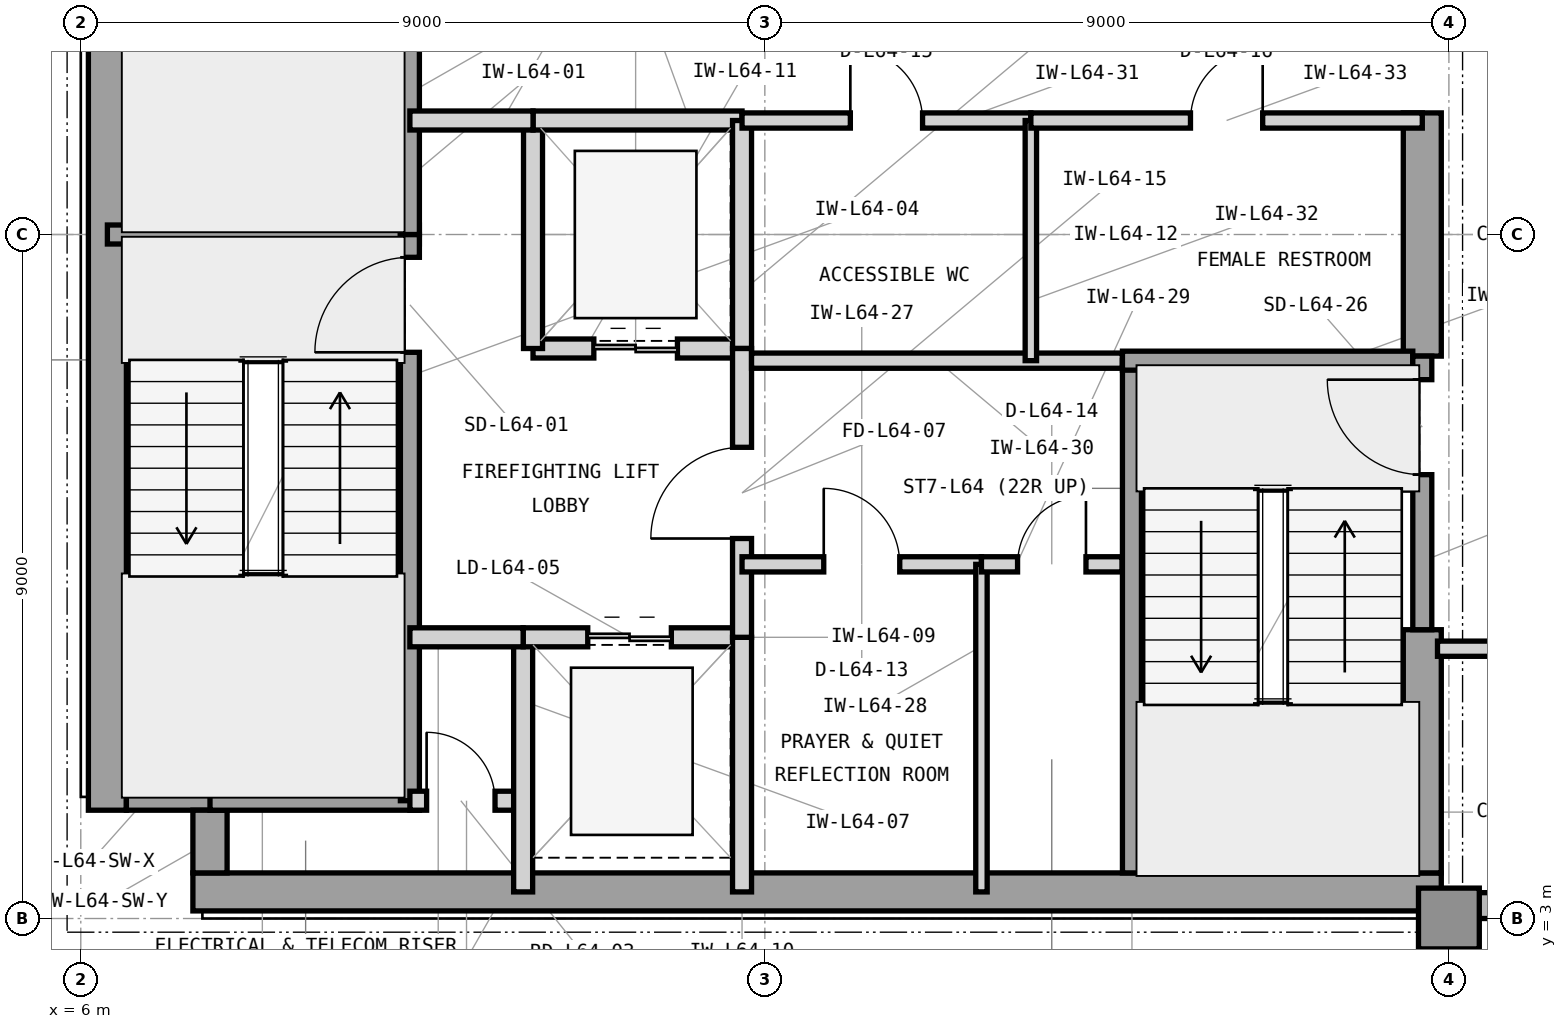
"""IFC4 building model, lengths in metres.
Left out: names, types, materials, properties, quantities, classifications, styles, units other than length and angle.
Written with IfcOpenShell. Run it as: python <this file> out.ifc"""

import sys

from ifc_helpers import new_model, si_unit, direction, frame, frame_2d, origin, origin_2d, place, context, subcontext, project, spatial, rectangle, extrude, element, fill, save


model = new_model("IFC4")
c1 = context("Model", 3, precision=1e-05, world=origin(), true_north=direction((0.0, 1.0)))
c2 = subcontext(c1, "Body", "Model", "MODEL_VIEW")
j1 = project(units=[si_unit("LENGTHUNIT", "METRE"), si_unit("PLANEANGLEUNIT", "RADIAN")], contexts=[c1])
p1 = place(None, origin())
s1 = spatial("IfcSite", under=j1, at=p1, CompositionType="ELEMENT")
p2 = place(p1, origin())
s2 = spatial("IfcBuilding", under=s1, at=p2, CompositionType="ELEMENT")
p3 = place(p2, frame((0.0, 0.0, 262.5)))
s3 = spatial("IfcBuildingStorey", under=s2, at=p3, CompositionType="ELEMENT", Elevation=262.5)
p4 = place(p3, frame((7.475, 3.35, 0.0), z_axis=(0.0, 0.0, 1.0), x_axis=(1.0, 0.0, 0.0)))
e1 = element("IfcWall", 1, at=p4, inside=s3, PredefinedType="SHEAR", context=c2, shape_type="SweptSolid", body=[
    extrude(rectangle(XDim=16.425, YDim=0.5, at=frame_2d((8.212, 0.0))), origin(), (0.0, 0.0, 1.0), 3.9),
])
p5 = place(p3, frame((6.35, 4.425, 0.0), z_axis=(0.0, 0.0, 1.0), x_axis=(0.0, 1.0, 0.0)))
e2 = element("IfcWall", 2, at=p5, inside=s3, PredefinedType="SHEAR", context=c2, shape_type="SweptSolid", body=[
    extrude(rectangle(XDim=15.15, YDim=0.5, at=frame_2d((7.575, 0.0))), origin(), (0.0, 0.0, 1.0), 3.9),
])
p6 = place(p3, frame((23.65, 3.6, 0.0), z_axis=(0.0, 0.0, 1.0), x_axis=(0.0, 1.0, 0.0)))
e3 = element("IfcWall", 3, at=p6, inside=s3, PredefinedType="SHEAR", context=c2, shape_type="SweptSolid", body=[
    extrude(rectangle(XDim=3.2, YDim=0.5, at=frame_2d((1.6, 0.0))), origin(), (0.0, 0.0, 1.0), 3.9),
])
p7 = place(p3, frame((23.65, 10.4, 0.0), z_axis=(0.0, 0.0, 1.0), x_axis=(0.0, 1.0, 0.0)))
e4 = element("IfcWall", 4, at=p7, inside=s3, PredefinedType="SHEAR", context=c2, shape_type="SweptSolid", body=[
    extrude(rectangle(XDim=3.2, YDim=0.5, at=frame_2d((1.6, 0.0))), origin(), (0.0, 0.0, 1.0), 3.9),
])
p8 = place(p3, frame((6.6, 4.65, 0.0), z_axis=(0.0, 0.0, 1.0), x_axis=(1.0, 0.0, 0.0)))
e5 = element("IfcWall", 5, at=p8, inside=s3, PredefinedType="SHEAR", context=c2, shape_type="SweptSolid", body=[
    extrude(rectangle(XDim=1.325, YDim=0.45, at=frame_2d((0.663, 0.0))), origin(), (0.0, 0.0, 1.0), 3.9),
])
p9 = place(p3, frame((7.7, 3.6, 0.0), z_axis=(0.0, 0.0, 1.0), x_axis=(0.0, 1.0, 0.0)))
e6 = element("IfcWall", 6, at=p9, inside=s3, PredefinedType="SHEAR", context=c2, shape_type="SweptSolid", body=[
    extrude(rectangle(XDim=0.825, YDim=0.45, at=frame_2d((0.413, 0.0))), origin(), (0.0, 0.0, 1.0), 3.9),
])
p10 = place(p3, frame((24.0, 3.0, 0.0), z_axis=(0.0, 0.0, 1.0), x_axis=(1.0, 0.0, 0.0)))
e7 = element("IfcColumn", 7, at=p10, inside=s3, PredefinedType="COLUMN", context=c2, shape_type="SweptSolid", body=[
    extrude(rectangle(XDim=0.8, YDim=0.8, at=origin_2d()), origin(), (0.0, 0.0, 1.0), 3.9),
])
p11 = place(p3, frame((23.9, 3.17, 0.0), z_axis=(0.0, 0.0, 1.0), x_axis=(1.0, 0.0, 0.0)))
e8 = element("IfcWall", 8, at=p11, inside=s3, PredefinedType="STANDARD", context=c2, shape_type="SweptSolid", body=[
    extrude(rectangle(XDim=28.5, YDim=0.34, at=frame_2d((14.25, 0.0))), origin(), (0.0, 0.0, 1.0), 3.715),
])
p12 = place(p11, frame((1.425, 0.0, 0.8)))
e9 = element("IfcOpeningElement", 9, at=p12, cuts=e8, PredefinedType="OPENING", context=c2, shape_type="SweptSolid", body=[
    extrude(rectangle(XDim=1.9, YDim=2.35, at=frame_2d((0.95, 1.175))), frame((0.0, 0.18, 0.0), z_axis=(0.0, -1.0, 0.0), x_axis=(1.0, 0.0, 0.0)), (0.0, 0.0, 1.0), 0.36),
])
p13 = place(p11, frame((10.575, 0.0, 0.8)))
e10 = element("IfcOpeningElement", 10, at=p13, cuts=e8, PredefinedType="OPENING", context=c2, shape_type="SweptSolid", body=[
    extrude(rectangle(XDim=2.6, YDim=2.35, at=frame_2d((1.3, 1.175))), frame((0.0, 0.18, 0.0), z_axis=(0.0, -1.0, 0.0), x_axis=(1.0, 0.0, 0.0)), (0.0, 0.0, 1.0), 0.36),
])
p14 = place(p11, frame((20.075, 0.0, 0.8)))
e11 = element("IfcOpeningElement", 11, at=p14, cuts=e8, PredefinedType="OPENING", context=c2, shape_type="SweptSolid", body=[
    extrude(rectangle(XDim=2.6, YDim=2.35, at=frame_2d((1.3, 1.175))), frame((0.0, 0.18, 0.0), z_axis=(0.0, -1.0, 0.0), x_axis=(1.0, 0.0, 0.0)), (0.0, 0.0, 1.0), 0.36),
])
p15 = place(p3, frame((6.35, 12.0, 0.0), z_axis=(0.0, 0.0, 1.0), x_axis=(1.0, 0.0, 0.0)))
e12 = element("IfcWall", 12, at=p15, inside=s3, PredefinedType="SHEAR", context=c2, shape_type="SweptSolid", body=[
    extrude(rectangle(XDim=4.105, YDim=0.25, at=frame_2d((2.052, 0.0))), origin(), (0.0, 0.0, 1.0), 3.9),
])
p16 = place(p3, frame((7.7, 4.55, 0.0), z_axis=(0.0, 0.0, 1.0), x_axis=(1.0, 0.0, 0.0)))
e13 = element("IfcWall", 13, at=p16, inside=s3, PredefinedType="SHEAR", context=c2, shape_type="SweptSolid", body=[
    extrude(rectangle(XDim=2.755, YDim=0.25, at=frame_2d((1.377, 0.0))), origin(), (0.0, 0.0, 1.0), 3.9),
])
p17 = place(p3, frame((10.33, 4.55, 0.0), z_axis=(0.0, 0.0, 1.0), x_axis=(0.0, 1.0, 0.0)))
e14 = element("IfcWall", 14, at=p17, inside=s3, PredefinedType="SHEAR", context=c2, shape_type="SweptSolid", body=[
    extrude(rectangle(XDim=7.45, YDim=0.25, at=frame_2d((3.725, 0.0))), origin(), (0.0, 0.0, 1.0), 3.9),
])
p18 = place(p17, frame((5.9, 0.0, 0.0)))
e15 = element("IfcOpeningElement", 15, at=p18, cuts=e14, PredefinedType="OPENING", context=c2, shape_type="SweptSolid", body=[
    extrude(rectangle(XDim=1.25, YDim=2.2, at=frame_2d((0.625, 1.1))), frame((0.0, 0.135, 0.0), z_axis=(0.0, -1.0, 0.0), x_axis=(1.0, 0.0, 0.0)), (0.0, 0.0, 1.0), 0.27),
])
p19 = place(p3, frame((10.33, 12.0, 0.0), z_axis=(0.0, 0.0, 1.0), x_axis=(0.0, 1.0, 0.0)))
e16 = element("IfcWall", 16, at=p19, inside=s3, PredefinedType="SHEAR", context=c2, shape_type="SweptSolid", body=[
    extrude(rectangle(XDim=7.45, YDim=0.25, at=frame_2d((3.725, 0.0))), origin(), (0.0, 0.0, 1.0), 3.9),
])
p20 = place(p19, frame((5.85, 0.0, 0.0)))
e17 = element("IfcOpeningElement", 17, at=p20, cuts=e16, PredefinedType="OPENING", context=c2, shape_type="SweptSolid", body=[
    extrude(rectangle(XDim=1.25, YDim=2.2, at=frame_2d((0.625, 1.1))), frame((0.0, 0.135, 0.0), z_axis=(0.0, -1.0, 0.0), x_axis=(1.0, 0.0, 0.0)), (0.0, 0.0, 1.0), 0.27),
])
p21 = place(p3, frame((10.33, 4.55, 0.0), z_axis=(0.0, 0.0, 1.0), x_axis=(1.0, 0.0, 0.0)))
e18 = element("IfcWall", 18, at=p21, inside=s3, PredefinedType="PARTITIONING", context=c2, shape_type="SweptSolid", body=[
    extrude(rectangle(XDim=1.49, YDim=0.25, at=frame_2d((0.745, 0.0))), origin(), (0.0, 0.0, 1.0), 3.705),
])
p22 = place(p21, frame((0.22, 0.0, 0.0)))
e19 = element("IfcOpeningElement", 19, at=p22, cuts=e18, PredefinedType="OPENING", context=c2, shape_type="SweptSolid", body=[
    extrude(rectangle(XDim=0.9, YDim=2.1, at=frame_2d((0.45, 1.05))), frame((0.0, 0.135, 0.0), z_axis=(0.0, -1.0, 0.0), x_axis=(1.0, 0.0, 0.0)), (0.0, 0.0, 1.0), 0.27),
])
p23 = place(p3, frame((11.82, 3.35, 0.0), z_axis=(0.0, 0.0, 1.0), x_axis=(0.0, 1.0, 0.0)))
e20 = element("IfcWall", 20, at=p23, inside=s3, PredefinedType="PARTITIONING", context=c2, shape_type="SweptSolid", body=[
    extrude(rectangle(XDim=3.35, YDim=0.25, at=frame_2d((1.675, 0.0))), origin(), (0.0, 0.0, 1.0), 3.705),
])
p24 = place(p3, frame((11.82, 6.7, 0.0), z_axis=(0.0, 0.0, 1.0), x_axis=(1.0, 0.0, 0.0)))
e21 = element("IfcWall", 21, at=p24, inside=s3, PredefinedType="PARTITIONING", context=c2, shape_type="SweptSolid", body=[
    extrude(rectangle(XDim=2.88, YDim=0.25, at=frame_2d((1.44, 0.0))), origin(), (0.0, 0.0, 1.0), 3.088),
])
p25 = place(p24, frame((0.85, 0.0, 0.0)))
e22 = element("IfcOpeningElement", 22, at=p25, cuts=e21, PredefinedType="OPENING", context=c2, shape_type="SweptSolid", body=[
    extrude(rectangle(XDim=1.1, YDim=2.25, at=frame_2d((0.55, 1.125))), frame((0.0, 0.135, 0.0), z_axis=(0.0, -1.0, 0.0), x_axis=(1.0, 0.0, 0.0)), (0.0, 0.0, 1.0), 0.27),
])
p26 = place(p3, frame((14.7, 3.35, 0.0), z_axis=(0.0, 0.0, 1.0), x_axis=(0.0, 1.0, 0.0)))
e23 = element("IfcWall", 23, at=p26, inside=s3, PredefinedType="PARTITIONING", context=c2, shape_type="SweptSolid", body=[
    extrude(rectangle(XDim=3.35, YDim=0.25, at=frame_2d((1.675, 0.0))), origin(), (0.0, 0.0, 1.0), 3.705),
])
p27 = place(p3, frame((11.95, 10.5, 0.0), z_axis=(0.0, 0.0, 1.0), x_axis=(1.0, 0.0, 0.0)))
e24 = element("IfcWall", 24, at=p27, inside=s3, PredefinedType="PARTITIONING", context=c2, shape_type="SweptSolid", body=[
    extrude(rectangle(XDim=2.75, YDim=0.25, at=frame_2d((1.375, 0.0))), origin(), (0.0, 0.0, 1.0), 3.088),
])
p28 = place(p27, frame((0.8, 0.0, 0.0)))
e25 = element("IfcOpeningElement", 25, at=p28, cuts=e24, PredefinedType="OPENING", context=c2, shape_type="SweptSolid", body=[
    extrude(rectangle(XDim=1.1, YDim=2.25, at=frame_2d((0.55, 1.125))), frame((0.0, 0.135, 0.0), z_axis=(0.0, -1.0, 0.0), x_axis=(1.0, 0.0, 0.0)), (0.0, 0.0, 1.0), 0.27),
])
p29 = place(p3, frame((11.95, 10.5, 0.0), z_axis=(0.0, 0.0, 1.0), x_axis=(0.0, 1.0, 0.0)))
e26 = element("IfcWall", 26, at=p29, inside=s3, PredefinedType="PARTITIONING", context=c2, shape_type="SweptSolid", body=[
    extrude(rectangle(XDim=3.0, YDim=0.25, at=frame_2d((1.5, 0.0))), origin(), (0.0, 0.0, 1.0), 3.705),
])
p30 = place(p3, frame((11.95, 13.5, 0.0), z_axis=(0.0, 0.0, 1.0), x_axis=(1.0, 0.0, 0.0)))
e27 = element("IfcWall", 27, at=p30, inside=s3, PredefinedType="PARTITIONING", context=c2, shape_type="SweptSolid", body=[
    extrude(rectangle(XDim=2.75, YDim=0.25, at=frame_2d((1.375, 0.0))), origin(), (0.0, 0.0, 1.0), 3.088),
])
p31 = place(p3, frame((14.7, 10.5, 0.0), z_axis=(0.0, 0.0, 1.0), x_axis=(0.0, 1.0, 0.0)))
e28 = element("IfcWall", 28, at=p31, inside=s3, PredefinedType="PARTITIONING", context=c2, shape_type="SweptSolid", body=[
    extrude(rectangle(XDim=3.0, YDim=0.25, at=frame_2d((1.5, 0.0))), origin(), (0.0, 0.0, 1.0), 3.705),
])
p32 = place(p3, frame((14.7, 6.7, 0.0), z_axis=(0.0, 0.0, 1.0), x_axis=(0.0, 1.0, 0.0)))
e29 = element("IfcWall", 29, at=p32, inside=s3, PredefinedType="PARTITIONING", context=c2, shape_type="SweptSolid", body=[
    extrude(rectangle(XDim=3.8, YDim=0.25, at=frame_2d((1.9, 0.0))), origin(), (0.0, 0.0, 1.0), 3.705),
])
p33 = place(p32, frame((1.3, 0.0, 0.0)))
e30 = element("IfcOpeningElement", 30, at=p33, cuts=e29, PredefinedType="OPENING", context=c2, shape_type="SweptSolid", body=[
    extrude(rectangle(XDim=1.2, YDim=2.2, at=frame_2d((0.6, 1.1))), frame((0.0, 0.135, 0.0), z_axis=(0.0, -1.0, 0.0), x_axis=(1.0, 0.0, 0.0)), (0.0, 0.0, 1.0), 0.27),
])
p34 = place(p3, frame((10.33, 13.5, 0.0), z_axis=(0.0, 0.0, 1.0), x_axis=(1.0, 0.0, 0.0)))
e31 = element("IfcWall", 31, at=p34, inside=s3, PredefinedType="PARTITIONING", context=c2, shape_type="SweptSolid", body=[
    extrude(rectangle(XDim=1.62, YDim=0.25, at=frame_2d((0.81, 0.0))), origin(), (0.0, 0.0, 1.0), 3.088),
])
p35 = place(p3, frame((10.33, 6.7, 0.0), z_axis=(0.0, 0.0, 1.0), x_axis=(1.0, 0.0, 0.0)))
e32 = element("IfcWall", 32, at=p35, inside=s3, PredefinedType="PARTITIONING", context=c2, shape_type="SweptSolid", body=[
    extrude(rectangle(XDim=1.49, YDim=0.25, at=frame_2d((0.745, 0.0))), origin(), (0.0, 0.0, 1.0), 3.088),
])
p36 = place(p3, frame((14.7, 7.66, 0.0), z_axis=(0.0, 0.0, 1.0), x_axis=(1.0, 0.0, 0.0)))
e33 = element("IfcWall", 33, at=p36, inside=s3, PredefinedType="PARTITIONING", context=c2, shape_type="SweptSolid", body=[
    extrude(rectangle(XDim=3.15, YDim=0.2, at=frame_2d((1.575, 0.0))), origin(), (0.0, 0.0, 1.0), 3.705),
])
p37 = place(p36, frame((1.075, 0.0, 0.0)))
e34 = element("IfcOpeningElement", 34, at=p37, cuts=e33, PredefinedType="OPENING", context=c2, shape_type="SweptSolid", body=[
    extrude(rectangle(XDim=1.0, YDim=2.15, at=frame_2d((0.5, 1.075))), frame((0.0, 0.11, 0.0), z_axis=(0.0, -1.0, 0.0), x_axis=(1.0, 0.0, 0.0)), (0.0, 0.0, 1.0), 0.22),
])
p38 = place(p3, frame((17.85, 3.35, 0.0), z_axis=(0.0, 0.0, 1.0), x_axis=(0.0, 1.0, 0.0)))
e35 = element("IfcWall", 35, at=p38, inside=s3, PredefinedType="PARTITIONING", context=c2, shape_type="SweptSolid", body=[
    extrude(rectangle(XDim=4.31, YDim=0.15, at=frame_2d((2.155, 0.0))), origin(), (0.0, 0.0, 1.0), 3.705),
])
p39 = place(p3, frame((17.85, 7.66, 0.0), z_axis=(0.0, 0.0, 1.0), x_axis=(1.0, 0.0, 0.0)))
e36 = element("IfcWall", 36, at=p39, inside=s3, PredefinedType="PARTITIONING", context=c2, shape_type="SweptSolid", body=[
    extrude(rectangle(XDim=1.85, YDim=0.2, at=frame_2d((0.925, 0.0))), origin(), (0.0, 0.0, 1.0), 3.705),
])
p40 = place(p39, frame((0.475, 0.0, 0.0)))
e37 = element("IfcOpeningElement", 37, at=p40, cuts=e36, PredefinedType="OPENING", context=c2, shape_type="SweptSolid", body=[
    extrude(rectangle(XDim=0.9, YDim=2.1, at=frame_2d((0.45, 1.05))), frame((0.0, 0.11, 0.0), z_axis=(0.0, -1.0, 0.0), x_axis=(1.0, 0.0, 0.0)), (0.0, 0.0, 1.0), 0.22),
])
p41 = place(p3, frame((14.825, 10.34, 0.0), z_axis=(0.0, 0.0, 1.0), x_axis=(1.0, 0.0, 0.0)))
e38 = element("IfcWall", 38, at=p41, inside=s3, PredefinedType="PARTITIONING", context=c2, shape_type="SweptSolid", body=[
    extrude(rectangle(XDim=4.88, YDim=0.2, at=frame_2d((2.44, 0.0))), origin(), (0.0, 0.0, 1.0), 3.088),
])
p42 = place(p3, frame((14.7, 13.5, 0.0), z_axis=(0.0, 0.0, 1.0), x_axis=(1.0, 0.0, 0.0)))
e39 = element("IfcWall", 39, at=p42, inside=s3, PredefinedType="PARTITIONING", context=c2, shape_type="SweptSolid", body=[
    extrude(rectangle(XDim=3.8, YDim=0.2, at=frame_2d((1.9, 0.0))), origin(), (0.0, 0.0, 1.0), 3.088),
])
p43 = place(p42, frame((1.425, 0.0, 0.0)))
e40 = element("IfcOpeningElement", 40, at=p43, cuts=e39, PredefinedType="OPENING", context=c2, shape_type="SweptSolid", body=[
    extrude(rectangle(XDim=0.95, YDim=2.1, at=frame_2d((0.475, 1.05))), frame((0.0, 0.11, 0.0), z_axis=(0.0, -1.0, 0.0), x_axis=(1.0, 0.0, 0.0)), (0.0, 0.0, 1.0), 0.22),
])
p44 = place(p3, frame((18.5, 10.34, 0.0), z_axis=(0.0, 0.0, 1.0), x_axis=(0.0, 1.0, 0.0)))
e41 = element("IfcWall", 41, at=p44, inside=s3, PredefinedType="PARTITIONING", context=c2, shape_type="SweptSolid", body=[
    extrude(rectangle(XDim=3.16, YDim=0.15, at=frame_2d((1.58, 0.0))), origin(), (0.0, 0.0, 1.0), 3.705),
])
p45 = place(p3, frame((18.5, 13.5, 0.0), z_axis=(0.0, 0.0, 1.0), x_axis=(1.0, 0.0, 0.0)))
e42 = element("IfcWall", 42, at=p45, inside=s3, PredefinedType="PARTITIONING", context=c2, shape_type="SweptSolid", body=[
    extrude(rectangle(XDim=5.15, YDim=0.2, at=frame_2d((2.575, 0.0))), origin(), (0.0, 0.0, 1.0), 3.088),
])
p46 = place(p45, frame((2.1, 0.0, 0.0)))
e43 = element("IfcOpeningElement", 43, at=p46, cuts=e42, PredefinedType="OPENING", context=c2, shape_type="SweptSolid", body=[
    extrude(rectangle(XDim=0.95, YDim=2.1, at=frame_2d((0.475, 1.05))), frame((0.0, 0.11, 0.0), z_axis=(0.0, -1.0, 0.0), x_axis=(1.0, 0.0, 0.0)), (0.0, 0.0, 1.0), 0.22),
])
p47 = place(p3, frame((23.85, 6.55, 0.0), z_axis=(0.0, 0.0, 1.0), x_axis=(1.0, 0.0, 0.0)))
e44 = element("IfcWall", 44, at=p47, inside=s3, PredefinedType="PARTITIONING", context=c2, shape_type="SweptSolid", body=[
    extrude(rectangle(XDim=7.35, YDim=0.2, at=frame_2d((3.675, 0.0))), origin(), (0.0, 0.0, 1.0), 3.705),
])
p48 = place(p47, frame((2.8, 0.0, 0.0)))
e45 = element("IfcOpeningElement", 45, at=p48, cuts=e44, PredefinedType="OPENING", context=c2, shape_type="SweptSolid", body=[
    extrude(rectangle(XDim=1.0, YDim=2.15, at=frame_2d((0.5, 1.075))), frame((0.0, 0.11, 0.0), z_axis=(0.0, -1.0, 0.0), x_axis=(1.0, 0.0, 0.0)), (0.0, 0.0, 1.0), 0.22),
])
p49 = place(p3, frame((19.83, 3.6, 0.0), z_axis=(0.0, 0.0, 1.0), x_axis=(0.0, 1.0, 0.0)))
e46 = element("IfcWall", 46, at=p49, inside=s3, PredefinedType="SHEAR", context=c2, shape_type="SweptSolid", body=[
    extrude(rectangle(XDim=6.74, YDim=0.25, at=frame_2d((3.37, 0.0))), origin(), (0.0, 0.0, 1.0), 3.9),
])
p50 = place(p3, frame((19.705, 10.34, 0.0), z_axis=(0.0, 0.0, 1.0), x_axis=(1.0, 0.0, 0.0)))
e47 = element("IfcWall", 47, at=p50, inside=s3, PredefinedType="SHEAR", context=c2, shape_type="SweptSolid", body=[
    extrude(rectangle(XDim=3.82, YDim=0.25, at=frame_2d((1.91, 0.0))), origin(), (0.0, 0.0, 1.0), 3.9),
])
p51 = place(p3, frame((23.65, 6.8, 0.0), z_axis=(0.0, 0.0, 1.0), x_axis=(0.0, 1.0, 0.0)))
e48 = element("IfcWall", 48, at=p51, inside=s3, PredefinedType="SHEAR", context=c2, shape_type="SweptSolid", body=[
    extrude(rectangle(XDim=3.6, YDim=0.25, at=frame_2d((1.8, 0.0))), origin(), (0.0, 0.0, 1.0), 3.9),
])
p52 = place(p51, frame((2.04, 0.0, 0.0)))
e49 = element("IfcOpeningElement", 49, at=p52, cuts=e48, PredefinedType="OPENING", context=c2, shape_type="SweptSolid", body=[
    extrude(rectangle(XDim=1.25, YDim=2.2, at=frame_2d((0.625, 1.1))), frame((0.0, 0.135, 0.0), z_axis=(0.0, -1.0, 0.0), x_axis=(1.0, 0.0, 0.0)), (0.0, 0.0, 1.0), 0.27),
])
p53 = place(p18, origin())
e50 = element("IfcDoor", 50, at=p53, inside=s3, OperationType="SINGLE_SWING_LEFT", PredefinedType="DOOR", context=c2, shape_type="SweptSolid", body=[
    extrude(rectangle(XDim=1.25, YDim=2.2, at=frame_2d((0.625, 1.1))), frame((0.0, 0.025, 0.0), z_axis=(0.0, -1.0, 0.0), x_axis=(1.0, 0.0, 0.0)), (0.0, 0.0, 1.0), 0.05),
])
fill(e15, e50)
p54 = place(p22, origin())
e51 = element("IfcDoor", 51, at=p54, inside=s3, OperationType="SINGLE_SWING_LEFT", PredefinedType="TRAPDOOR", context=c2, shape_type="SweptSolid", body=[
    extrude(rectangle(XDim=0.9, YDim=2.1, at=frame_2d((0.45, 1.05))), frame((0.0, 0.025, 0.0), z_axis=(0.0, -1.0, 0.0), x_axis=(1.0, 0.0, 0.0)), (0.0, 0.0, 1.0), 0.05),
])
fill(e19, e51)
p55 = place(p25, origin())
e52 = element("IfcDoor", 52, at=p55, inside=s3, OperationType="DOUBLE_DOOR_SLIDING", PredefinedType="DOOR", context=c2, shape_type="SweptSolid", body=[
    extrude(rectangle(XDim=1.1, YDim=2.25, at=frame_2d((0.55, 1.125))), frame((0.0, 0.025, 0.0), z_axis=(0.0, -1.0, 0.0), x_axis=(1.0, 0.0, 0.0)), (0.0, 0.0, 1.0), 0.05),
])
fill(e22, e52)
p56 = place(p28, origin())
e53 = element("IfcDoor", 53, at=p56, inside=s3, OperationType="DOUBLE_DOOR_SLIDING", PredefinedType="DOOR", context=c2, shape_type="SweptSolid", body=[
    extrude(rectangle(XDim=1.1, YDim=2.25, at=frame_2d((0.55, 1.125))), frame((0.0, 0.025, 0.0), z_axis=(0.0, -1.0, 0.0), x_axis=(1.0, 0.0, 0.0)), (0.0, 0.0, 1.0), 0.05),
])
fill(e25, e53)
p57 = place(p33, origin())
e54 = element("IfcDoor", 54, at=p57, inside=s3, OperationType="SINGLE_SWING_LEFT", PredefinedType="DOOR", context=c2, shape_type="SweptSolid", body=[
    extrude(rectangle(XDim=1.2, YDim=2.2, at=frame_2d((0.6, 1.1))), frame((0.0, 0.025, 0.0), z_axis=(0.0, -1.0, 0.0), x_axis=(1.0, 0.0, 0.0)), (0.0, 0.0, 1.0), 0.05),
])
fill(e30, e54)
p58 = place(p37, origin())
e55 = element("IfcDoor", 55, at=p58, inside=s3, OperationType="SINGLE_SWING_LEFT", PredefinedType="DOOR", context=c2, shape_type="SweptSolid", body=[
    extrude(rectangle(XDim=1.0, YDim=2.15, at=frame_2d((0.5, 1.075))), frame((0.0, 0.025, 0.0), z_axis=(0.0, -1.0, 0.0), x_axis=(1.0, 0.0, 0.0)), (0.0, 0.0, 1.0), 0.05),
])
fill(e34, e55)
p59 = place(p40, origin())
e56 = element("IfcDoor", 56, at=p59, inside=s3, OperationType="SINGLE_SWING_RIGHT", PredefinedType="TRAPDOOR", context=c2, shape_type="SweptSolid", body=[
    extrude(rectangle(XDim=0.9, YDim=2.1, at=frame_2d((0.45, 1.05))), frame((0.0, 0.025, 0.0), z_axis=(0.0, -1.0, 0.0), x_axis=(1.0, 0.0, 0.0)), (0.0, 0.0, 1.0), 0.05),
])
fill(e37, e56)
p60 = place(p43, origin())
e57 = element("IfcDoor", 57, at=p60, inside=s3, OperationType="SINGLE_SWING_LEFT", PredefinedType="DOOR", context=c2, shape_type="SweptSolid", body=[
    extrude(rectangle(XDim=0.95, YDim=2.1, at=frame_2d((0.475, 1.05))), frame((0.0, 0.025, 0.0), z_axis=(0.0, -1.0, 0.0), x_axis=(1.0, 0.0, 0.0)), (0.0, 0.0, 1.0), 0.05),
])
fill(e40, e57)
p61 = place(p46, origin())
e58 = element("IfcDoor", 58, at=p61, inside=s3, OperationType="SINGLE_SWING_RIGHT", PredefinedType="DOOR", context=c2, shape_type="SweptSolid", body=[
    extrude(rectangle(XDim=0.95, YDim=2.1, at=frame_2d((0.475, 1.05))), frame((0.0, 0.025, 0.0), z_axis=(0.0, -1.0, 0.0), x_axis=(1.0, 0.0, 0.0)), (0.0, 0.0, 1.0), 0.05),
])
fill(e43, e58)
p62 = place(p52, origin())
e59 = element("IfcDoor", 59, at=p62, inside=s3, OperationType="SINGLE_SWING_RIGHT", PredefinedType="DOOR", context=c2, shape_type="SweptSolid", body=[
    extrude(rectangle(XDim=1.25, YDim=2.2, at=frame_2d((0.625, 1.1))), frame((0.0, 0.025, 0.0), z_axis=(0.0, -1.0, 0.0), x_axis=(1.0, 0.0, 0.0)), (0.0, 0.0, 1.0), 0.05),
])
fill(e49, e59)
save(model, sys.argv[1])
